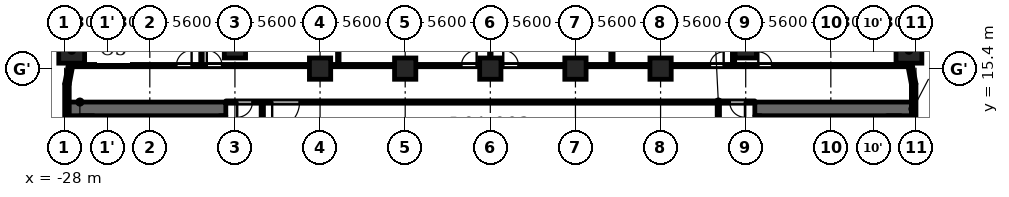
"""IFC4 building model, lengths in metres.
Left out: names, types, materials, properties, quantities, classifications, styles, units other than length and angle.
Written with IfcOpenShell. Run it as: python <this file> out.ifc"""

import sys

from ifc_helpers import new_model, si_unit, direction, frame, frame_2d, origin, origin_2d, place, context, subcontext, project, spatial, rectangle, extrude, element, fill, save


model = new_model("IFC4")
c1 = context("Model", 3, precision=1e-05, world=origin(), true_north=direction((0.0, 1.0)))
c2 = subcontext(c1, "Body", "Model", "MODEL_VIEW")
j1 = project(units=[si_unit("LENGTHUNIT", "METRE"), si_unit("PLANEANGLEUNIT", "RADIAN")], contexts=[c1])
p1 = place(None, origin())
s1 = spatial("IfcSite", under=j1, at=p1, CompositionType="ELEMENT")
p2 = place(p1, origin())
s2 = spatial("IfcBuilding", under=s1, at=p2, CompositionType="ELEMENT")
p3 = place(p2, frame((0.0, 0.0, 6.5)))
s3 = spatial("IfcBuildingStorey", under=s2, at=p3, CompositionType="ELEMENT", Elevation=6.5)
for number, where, z_axis, x_axis in (
    (1, (27.538, 16.609, 0.0), (0.0, 0.0, 1.0), (1.0, 0.0, 0.0)),
    (2, (-27.538, 16.609, 0.0), (0.0, 0.0, 1.0), (1.0, 0.0, 0.0)),
):
    element("IfcColumn", number, at=place(p3, frame(where, z_axis=z_axis, x_axis=x_axis)), inside=s3, PredefinedType="COLUMN", context=c2, shape_type="SweptSolid", body=[
        extrude(rectangle(XDim=1.7, YDim=1.7, at=origin_2d()), origin(), (0.0, 0.0, 1.0), 4.8),
    ])
for number, where, z_axis, x_axis in (
    (3, (-16.8, 16.8, 0.0), (0.0, 0.0, 1.0), (1.0, 0.0, 0.0)),
    (4, (16.8, 16.8, 0.0), (0.0, 0.0, 1.0), (1.0, 0.0, 0.0)),
    (5, (-11.2, 15.4, 0.0), (0.0, 0.0, 1.0), (1.0, 0.0, 0.0)),
    (6, (-5.6, 15.4, 0.0), (0.0, 0.0, 1.0), (1.0, 0.0, 0.0)),
    (7, (0.0, 15.4, 0.0), (0.0, 0.0, 1.0), (1.0, 0.0, 0.0)),
    (8, (5.6, 15.4, 0.0), (0.0, 0.0, 1.0), (1.0, 0.0, 0.0)),
    (9, (11.2, 15.4, 0.0), (0.0, 0.0, 1.0), (1.0, 0.0, 0.0)),
):
    element("IfcColumn", number, at=place(p3, frame(where, z_axis=z_axis, x_axis=x_axis)), inside=s3, PredefinedType="COLUMN", context=c2, shape_type="SweptSolid", body=[
        extrude(rectangle(XDim=1.4, YDim=1.4, at=origin_2d()), origin(), (0.0, 0.0, 1.0), 4.8),
    ])
p4 = place(p3, frame((27.85, 12.05, 0.0), z_axis=(0.0, 0.0, 1.0), x_axis=(0.0, 1.0, 0.0)))
e10 = element("IfcWall", 10, at=p4, inside=s3, PredefinedType="SOLIDWALL", context=c2, shape_type="SweptSolid", body=[
    extrude(rectangle(XDim=2.35, YDim=0.3, at=frame_2d((1.175, 0.0))), origin(), (0.0, 0.0, 1.0), 3.55),
])
for number, where, z_axis, x_axis in (
    (11, (27.853, 14.372, 0.0), (0.0, 0.0, 1.0), (-0.187, 0.982, 0.0)),
    (12, (-27.589, 15.753, 0.0), (0.0, 0.0, 1.0), (-0.187, -0.982, 0.0)),
):
    element("IfcWall", number, at=place(p3, frame(where, z_axis=z_axis, x_axis=x_axis)), inside=s3, PredefinedType="SOLIDWALL", context=c2, shape_type="SweptSolid", body=[
        extrude(rectangle(XDim=1.406, YDim=0.3, at=frame_2d((0.703, 0.0))), origin(), (0.0, 0.0, 1.0), 3.55),
    ])
p5 = place(p3, frame((-27.85, 14.4, 0.0), z_axis=(0.0, 0.0, 1.0), x_axis=(0.0, -1.0, 0.0)))
e13 = element("IfcWall", 13, at=p5, inside=s3, PredefinedType="SOLIDWALL", context=c2, shape_type="SweptSolid", body=[
    extrude(rectangle(XDim=2.35, YDim=0.3, at=frame_2d((1.175, 0.0))), origin(), (0.0, 0.0, 1.0), 3.55),
])
p6 = place(p3, frame((-17.4, 12.75, 0.0), z_axis=(0.0, 0.0, 1.0), x_axis=(-1.0, 0.0, 0.0)))
e14 = element("IfcWall", 14, at=p6, inside=s3, PredefinedType="SHEAR", context=c2, shape_type="SweptSolid", body=[
    extrude(rectangle(XDim=10.4, YDim=0.9, at=frame_2d((5.2, 0.0))), origin(), (0.0, 0.0, 1.0), 4.45),
])
p7 = place(p3, frame((-17.6, -12.3, 0.0), z_axis=(0.0, 0.0, 1.0), x_axis=(0.0, 1.0, 0.0)))
e15 = element("IfcWall", 15, at=p7, inside=s3, PredefinedType="SHEAR", context=c2, shape_type="SweptSolid", body=[
    extrude(rectangle(XDim=24.6, YDim=0.4, at=frame_2d((12.3, 0.0))), origin(), (0.0, 0.0, 1.0), 4.45),
])
p8 = place(p7, frame((6.0, 0.0, 0.0)))
e16 = element("IfcOpeningElement", 16, at=p8, cuts=e15, PredefinedType="OPENING", context=c2, shape_type="SweptSolid", body=[
    extrude(rectangle(XDim=1.1, YDim=2.1, at=frame_2d((0.55, 1.05))), frame((0.0, 0.21, 0.0), z_axis=(0.0, -1.0, 0.0), x_axis=(1.0, 0.0, 0.0)), (0.0, 0.0, 1.0), 0.42),
])
p9 = place(p7, frame((8.4, 0.0, 0.0)))
e17 = element("IfcOpeningElement", 17, at=p9, cuts=e15, PredefinedType="OPENING", context=c2, shape_type="SweptSolid", body=[
    extrude(rectangle(XDim=1.1, YDim=2.1, at=frame_2d((0.55, 1.05))), frame((0.0, 0.21, 0.0), z_axis=(0.0, -1.0, 0.0), x_axis=(1.0, 0.0, 0.0)), (0.0, 0.0, 1.0), 0.42),
])
p10 = place(p7, frame((10.8, 0.0, 0.0)))
e18 = element("IfcOpeningElement", 18, at=p10, cuts=e15, PredefinedType="OPENING", context=c2, shape_type="SweptSolid", body=[
    extrude(rectangle(XDim=1.1, YDim=2.1, at=frame_2d((0.55, 1.05))), frame((0.0, 0.21, 0.0), z_axis=(0.0, -1.0, 0.0), x_axis=(1.0, 0.0, 0.0)), (0.0, 0.0, 1.0), 0.42),
])
p11 = place(p7, frame((16.75, 0.0, 0.0)))
e19 = element("IfcOpeningElement", 19, at=p11, cuts=e15, PredefinedType="OPENING", context=c2, shape_type="SweptSolid", body=[
    extrude(rectangle(XDim=0.9, YDim=2.1, at=frame_2d((0.45, 1.05))), frame((0.0, 0.21, 0.0), z_axis=(0.0, -1.0, 0.0), x_axis=(1.0, 0.0, 0.0)), (0.0, 0.0, 1.0), 0.42),
])
p12 = place(p7, frame((22.8, 0.0, 0.0)))
e20 = element("IfcOpeningElement", 20, at=p12, cuts=e15, PredefinedType="OPENING", context=c2, shape_type="SweptSolid", body=[
    extrude(rectangle(XDim=1.1, YDim=2.1, at=frame_2d((0.55, 1.05))), frame((0.0, 0.21, 0.0), z_axis=(0.0, -1.0, 0.0), x_axis=(1.0, 0.0, 0.0)), (0.0, 0.0, 1.0), 0.42),
])
p13 = place(p7, frame((0.7, 0.0, 0.0)))
e21 = element("IfcOpeningElement", 21, at=p13, cuts=e15, PredefinedType="OPENING", context=c2, shape_type="SweptSolid", body=[
    extrude(rectangle(XDim=1.1, YDim=2.1, at=frame_2d((0.55, 1.05))), frame((0.0, 0.21, 0.0), z_axis=(0.0, -1.0, 0.0), x_axis=(1.0, 0.0, 0.0)), (0.0, 0.0, 1.0), 0.42),
])
p14 = place(p7, frame((12.775, 0.0, 0.0)))
e22 = element("IfcOpeningElement", 22, at=p14, cuts=e15, PredefinedType="OPENING", context=c2, shape_type="SweptSolid", body=[
    extrude(rectangle(XDim=1.8, YDim=2.1, at=frame_2d((0.9, 1.05))), frame((0.0, 0.21, 0.0), z_axis=(0.0, -1.0, 0.0), x_axis=(1.0, 0.0, 0.0)), (0.0, 0.0, 1.0), 0.42),
])
p15 = place(p3, frame((-26.55, -12.3, 0.0), z_axis=(0.0, 0.0, 1.0), x_axis=(0.0, 1.0, 0.0)))
e23 = element("IfcWall", 23, at=p15, inside=s3, PredefinedType="SHEAR", context=c2, shape_type="SweptSolid", body=[
    extrude(rectangle(XDim=24.6, YDim=0.9, at=frame_2d((12.3, 0.0))), origin(), (0.0, 0.0, 1.0), 4.45),
])
p16 = place(p3, frame((-23.55, 9.8, 0.0), z_axis=(0.0, 0.0, 1.0), x_axis=(0.0, 1.0, 0.0)))
e24 = element("IfcWall", 24, at=p16, inside=s3, PredefinedType="PARTITIONING", context=c2, shape_type="SweptSolid", body=[
    extrude(rectangle(XDim=2.5, YDim=0.2, at=frame_2d((1.25, 0.0))), origin(), (0.0, 0.0, 1.0), 4.45),
])
p17 = place(p16, frame((0.8, 0.0, 0.0)))
e25 = element("IfcOpeningElement", 25, at=p17, cuts=e24, PredefinedType="OPENING", context=c2, shape_type="SweptSolid", body=[
    extrude(rectangle(XDim=0.9, YDim=2.1, at=frame_2d((0.45, 1.05))), frame((0.0, 0.11, 0.0), z_axis=(0.0, -1.0, 0.0), x_axis=(1.0, 0.0, 0.0)), (0.0, 0.0, 1.0), 0.22),
])
p18 = place(p3, frame((17.4, 12.75, 0.0), z_axis=(0.0, 0.0, 1.0), x_axis=(1.0, 0.0, 0.0)))
e26 = element("IfcWall", 26, at=p18, inside=s3, PredefinedType="SHEAR", context=c2, shape_type="SweptSolid", body=[
    extrude(rectangle(XDim=10.4, YDim=0.9, at=frame_2d((5.2, 0.0))), origin(), (0.0, 0.0, 1.0), 4.45),
])
p19 = place(p3, frame((17.6, -12.3, 0.0), z_axis=(0.0, 0.0, 1.0), x_axis=(0.0, 1.0, 0.0)))
e27 = element("IfcWall", 27, at=p19, inside=s3, PredefinedType="SHEAR", context=c2, shape_type="SweptSolid", body=[
    extrude(rectangle(XDim=24.6, YDim=0.4, at=frame_2d((12.3, 0.0))), origin(), (0.0, 0.0, 1.0), 4.45),
])
p20 = place(p19, frame((6.0, 0.0, 0.0)))
e28 = element("IfcOpeningElement", 28, at=p20, cuts=e27, PredefinedType="OPENING", context=c2, shape_type="SweptSolid", body=[
    extrude(rectangle(XDim=1.1, YDim=2.1, at=frame_2d((0.55, 1.05))), frame((0.0, 0.21, 0.0), z_axis=(0.0, -1.0, 0.0), x_axis=(1.0, 0.0, 0.0)), (0.0, 0.0, 1.0), 0.42),
])
p21 = place(p19, frame((8.4, 0.0, 0.0)))
e29 = element("IfcOpeningElement", 29, at=p21, cuts=e27, PredefinedType="OPENING", context=c2, shape_type="SweptSolid", body=[
    extrude(rectangle(XDim=1.1, YDim=2.1, at=frame_2d((0.55, 1.05))), frame((0.0, 0.21, 0.0), z_axis=(0.0, -1.0, 0.0), x_axis=(1.0, 0.0, 0.0)), (0.0, 0.0, 1.0), 0.42),
])
p22 = place(p19, frame((10.8, 0.0, 0.0)))
e30 = element("IfcOpeningElement", 30, at=p22, cuts=e27, PredefinedType="OPENING", context=c2, shape_type="SweptSolid", body=[
    extrude(rectangle(XDim=1.1, YDim=2.1, at=frame_2d((0.55, 1.05))), frame((0.0, 0.21, 0.0), z_axis=(0.0, -1.0, 0.0), x_axis=(1.0, 0.0, 0.0)), (0.0, 0.0, 1.0), 0.42),
])
p23 = place(p19, frame((16.75, 0.0, 0.0)))
e31 = element("IfcOpeningElement", 31, at=p23, cuts=e27, PredefinedType="OPENING", context=c2, shape_type="SweptSolid", body=[
    extrude(rectangle(XDim=0.9, YDim=2.1, at=frame_2d((0.45, 1.05))), frame((0.0, 0.21, 0.0), z_axis=(0.0, -1.0, 0.0), x_axis=(1.0, 0.0, 0.0)), (0.0, 0.0, 1.0), 0.42),
])
p24 = place(p19, frame((22.8, 0.0, 0.0)))
e32 = element("IfcOpeningElement", 32, at=p24, cuts=e27, PredefinedType="OPENING", context=c2, shape_type="SweptSolid", body=[
    extrude(rectangle(XDim=1.1, YDim=2.1, at=frame_2d((0.55, 1.05))), frame((0.0, 0.21, 0.0), z_axis=(0.0, -1.0, 0.0), x_axis=(1.0, 0.0, 0.0)), (0.0, 0.0, 1.0), 0.42),
])
p25 = place(p19, frame((0.7, 0.0, 0.0)))
e33 = element("IfcOpeningElement", 33, at=p25, cuts=e27, PredefinedType="OPENING", context=c2, shape_type="SweptSolid", body=[
    extrude(rectangle(XDim=1.1, YDim=2.1, at=frame_2d((0.55, 1.05))), frame((0.0, 0.21, 0.0), z_axis=(0.0, -1.0, 0.0), x_axis=(1.0, 0.0, 0.0)), (0.0, 0.0, 1.0), 0.42),
])
p26 = place(p19, frame((12.775, 0.0, 0.0)))
e34 = element("IfcOpeningElement", 34, at=p26, cuts=e27, PredefinedType="OPENING", context=c2, shape_type="SweptSolid", body=[
    extrude(rectangle(XDim=1.8, YDim=2.1, at=frame_2d((0.9, 1.05))), frame((0.0, 0.21, 0.0), z_axis=(0.0, -1.0, 0.0), x_axis=(1.0, 0.0, 0.0)), (0.0, 0.0, 1.0), 0.42),
])
p27 = place(p3, frame((26.55, -12.3, 0.0), z_axis=(0.0, 0.0, 1.0), x_axis=(0.0, 1.0, 0.0)))
e35 = element("IfcWall", 35, at=p27, inside=s3, PredefinedType="SHEAR", context=c2, shape_type="SweptSolid", body=[
    extrude(rectangle(XDim=24.6, YDim=0.9, at=frame_2d((12.3, 0.0))), origin(), (0.0, 0.0, 1.0), 4.45),
])
p28 = place(p3, frame((23.55, 9.8, 0.0), z_axis=(0.0, 0.0, 1.0), x_axis=(0.0, 1.0, 0.0)))
e36 = element("IfcWall", 36, at=p28, inside=s3, PredefinedType="PARTITIONING", context=c2, shape_type="SweptSolid", body=[
    extrude(rectangle(XDim=2.5, YDim=0.2, at=frame_2d((1.25, 0.0))), origin(), (0.0, 0.0, 1.0), 4.45),
])
p29 = place(p28, frame((0.8, 0.0, 0.0)))
e37 = element("IfcOpeningElement", 37, at=p29, cuts=e36, PredefinedType="OPENING", context=c2, shape_type="SweptSolid", body=[
    extrude(rectangle(XDim=0.9, YDim=2.1, at=frame_2d((0.45, 1.05))), frame((0.0, 0.11, 0.0), z_axis=(0.0, -1.0, 0.0), x_axis=(1.0, 0.0, 0.0)), (0.0, 0.0, 1.0), 0.22),
])
p30 = place(p3, frame((-17.4, 13.2, 0.0), z_axis=(0.0, 0.0, 1.0), x_axis=(1.0, 0.0, 0.0)))
e38 = element("IfcWall", 38, at=p30, inside=s3, PredefinedType="PARTITIONING", context=c2, shape_type="SweptSolid", body=[
    extrude(rectangle(XDim=34.8, YDim=0.15, at=frame_2d((17.4, 0.0))), origin(), (0.0, 0.0, 1.0), 4.45),
])
p31 = place(p30, frame((3.05, 0.0, 0.0)))
e39 = element("IfcOpeningElement", 39, at=p31, cuts=e38, PredefinedType="OPENING", context=c2, shape_type="SweptSolid", body=[
    extrude(rectangle(XDim=1.8, YDim=2.1, at=frame_2d((0.9, 1.05))), frame((0.0, 0.085, 0.0), z_axis=(0.0, -1.0, 0.0), x_axis=(1.0, 0.0, 0.0)), (0.0, 0.0, 1.0), 0.17),
])
p32 = place(p30, frame((0.75, 0.0, 0.0)))
e40 = element("IfcOpeningElement", 40, at=p32, cuts=e38, PredefinedType="OPENING", context=c2, shape_type="SweptSolid", body=[
    extrude(rectangle(XDim=1.0, YDim=2.1, at=frame_2d((0.5, 1.05))), frame((0.0, 0.085, 0.0), z_axis=(0.0, -1.0, 0.0), x_axis=(1.0, 0.0, 0.0)), (0.0, 0.0, 1.0), 0.17),
])
p33 = place(p30, frame((33.15, 0.0, 0.0)))
e41 = element("IfcOpeningElement", 41, at=p33, cuts=e38, PredefinedType="OPENING", context=c2, shape_type="SweptSolid", body=[
    extrude(rectangle(XDim=1.0, YDim=2.1, at=frame_2d((0.5, 1.05))), frame((0.0, 0.085, 0.0), z_axis=(0.0, -1.0, 0.0), x_axis=(1.0, 0.0, 0.0)), (0.0, 0.0, 1.0), 0.17),
])
p34 = place(p3, frame((-27.446, 15.6, 0.0), z_axis=(0.0, 0.0, 1.0), x_axis=(1.0, 0.0, 0.0)))
e42 = element("IfcWall", 42, at=p34, inside=s3, PredefinedType="PARTITIONING", context=c2, shape_type="SweptSolid", body=[
    extrude(rectangle(XDim=54.892, YDim=0.15, at=frame_2d((27.446, 0.0))), origin(), (0.0, 0.0, 1.0), 4.45),
])
p35 = place(p34, frame((6.796, 0.0, 0.0)))
e43 = element("IfcOpeningElement", 43, at=p35, cuts=e42, PredefinedType="OPENING", context=c2, shape_type="SweptSolid", body=[
    extrude(rectangle(XDim=1.0, YDim=2.1, at=frame_2d((0.5, 1.05))), frame((0.0, 0.085, 0.0), z_axis=(0.0, -1.0, 0.0), x_axis=(1.0, 0.0, 0.0)), (0.0, 0.0, 1.0), 0.17),
])
p36 = place(p34, frame((8.796, 0.0, 0.0)))
e44 = element("IfcOpeningElement", 44, at=p36, cuts=e42, PredefinedType="OPENING", context=c2, shape_type="SweptSolid", body=[
    extrude(rectangle(XDim=1.0, YDim=2.1, at=frame_2d((0.5, 1.05))), frame((0.0, 0.085, 0.0), z_axis=(0.0, -1.0, 0.0), x_axis=(1.0, 0.0, 0.0)), (0.0, 0.0, 1.0), 0.17),
])
p37 = place(p34, frame((25.546, 0.0, 0.0)))
e45 = element("IfcOpeningElement", 45, at=p37, cuts=e42, PredefinedType="OPENING", context=c2, shape_type="SweptSolid", body=[
    extrude(rectangle(XDim=1.0, YDim=2.1, at=frame_2d((0.5, 1.05))), frame((0.0, 0.085, 0.0), z_axis=(0.0, -1.0, 0.0), x_axis=(1.0, 0.0, 0.0)), (0.0, 0.0, 1.0), 0.17),
])
p38 = place(p34, frame((28.296, 0.0, 0.0)))
e46 = element("IfcOpeningElement", 46, at=p38, cuts=e42, PredefinedType="OPENING", context=c2, shape_type="SweptSolid", body=[
    extrude(rectangle(XDim=1.0, YDim=2.1, at=frame_2d((0.5, 1.05))), frame((0.0, 0.085, 0.0), z_axis=(0.0, -1.0, 0.0), x_axis=(1.0, 0.0, 0.0)), (0.0, 0.0, 1.0), 0.17),
])
p39 = place(p34, frame((41.896, 0.0, 0.0)))
e47 = element("IfcOpeningElement", 47, at=p39, cuts=e42, PredefinedType="OPENING", context=c2, shape_type="SweptSolid", body=[
    extrude(rectangle(XDim=0.9, YDim=2.1, at=frame_2d((0.45, 1.05))), frame((0.0, 0.085, 0.0), z_axis=(0.0, -1.0, 0.0), x_axis=(1.0, 0.0, 0.0)), (0.0, 0.0, 1.0), 0.17),
])
p40 = place(p34, frame((45.075, 0.0, 0.0)))
e48 = element("IfcOpeningElement", 48, at=p40, cuts=e42, PredefinedType="OPENING", context=c2, shape_type="SweptSolid", body=[
    extrude(rectangle(XDim=0.9, YDim=2.1, at=frame_2d((0.45, 1.05))), frame((0.0, 0.085, 0.0), z_axis=(0.0, -1.0, 0.0), x_axis=(1.0, 0.0, 0.0)), (0.0, 0.0, 1.0), 0.17),
])
p41 = place(p3, frame((-19.0, 15.675, 0.0), z_axis=(0.0, 0.0, 1.0), x_axis=(0.0, 1.0, 0.0)))
e49 = element("IfcWall", 49, at=p41, inside=s3, PredefinedType="PARTITIONING", context=c2, shape_type="SweptSolid", body=[
    extrude(rectangle(XDim=6.405, YDim=0.1, at=frame_2d((3.203, 0.0))), origin(), (0.0, 0.0, 1.0), 4.45),
])
p42 = place(p3, frame((-15.0, 6.769, 0.0), z_axis=(0.0, 0.0, 1.0), x_axis=(0.0, 1.0, 0.0)))
e50 = element("IfcWall", 50, at=p42, inside=s3, PredefinedType="PARTITIONING", context=c2, shape_type="SweptSolid", body=[
    extrude(rectangle(XDim=6.356, YDim=0.15, at=frame_2d((3.178, 0.0))), origin(), (0.0, 0.0, 1.0), 4.45),
])
p43 = place(p3, frame((-10.0, 15.675, 0.0), z_axis=(0.0, 0.0, 1.0), x_axis=(0.0, 1.0, 0.0)))
e51 = element("IfcWall", 51, at=p43, inside=s3, PredefinedType="PARTITIONING", context=c2, shape_type="SweptSolid", body=[
    extrude(rectangle(XDim=6.405, YDim=0.1, at=frame_2d((3.203, 0.0))), origin(), (0.0, 0.0, 1.0), 4.45),
])
p44 = place(p3, frame((0.0, 15.675, 0.0), z_axis=(0.0, 0.0, 1.0), x_axis=(0.0, 1.0, 0.0)))
e52 = element("IfcWall", 52, at=p44, inside=s3, PredefinedType="PARTITIONING", context=c2, shape_type="SweptSolid", body=[
    extrude(rectangle(XDim=6.635, YDim=0.1, at=frame_2d((3.317, 0.0))), origin(), (0.0, 0.0, 1.0), 4.45),
])
p45 = place(p3, frame((8.0, 15.675, 0.0), z_axis=(0.0, 0.0, 1.0), x_axis=(0.0, 1.0, 0.0)))
e53 = element("IfcWall", 53, at=p45, inside=s3, PredefinedType="PARTITIONING", context=c2, shape_type="SweptSolid", body=[
    extrude(rectangle(XDim=6.405, YDim=0.15, at=frame_2d((3.203, 0.0))), origin(), (0.0, 0.0, 1.0), 4.45),
])
p46 = place(p3, frame((15.0, 6.769, 0.0), z_axis=(0.0, 0.0, 1.0), x_axis=(0.0, 1.0, 0.0)))
e54 = element("IfcWall", 54, at=p46, inside=s3, PredefinedType="PARTITIONING", context=c2, shape_type="SweptSolid", body=[
    extrude(rectangle(XDim=6.356, YDim=0.15, at=frame_2d((3.178, 0.0))), origin(), (0.0, 0.0, 1.0), 4.45),
])
p47 = place(p3, frame((16.0, 15.675, 0.0), z_axis=(0.0, 0.0, 1.0), x_axis=(0.0, 1.0, 0.0)))
e55 = element("IfcWall", 55, at=p47, inside=s3, PredefinedType="PARTITIONING", context=c2, shape_type="SweptSolid", body=[
    extrude(rectangle(XDim=6.635, YDim=0.15, at=frame_2d((3.317, 0.0))), origin(), (0.0, 0.0, 1.0), 4.45),
])
p48 = place(p31, origin())
e56 = element("IfcDoor", 56, at=p48, inside=s3, OperationType="SINGLE_SWING_LEFT", PredefinedType="DOOR", context=c2, shape_type="SweptSolid", body=[
    extrude(rectangle(XDim=1.8, YDim=2.1, at=frame_2d((0.9, 1.05))), frame((0.0, 0.025, 0.0), z_axis=(0.0, -1.0, 0.0), x_axis=(1.0, 0.0, 0.0)), (0.0, 0.0, 1.0), 0.05),
])
fill(e39, e56)
p49 = place(p32, origin())
e57 = element("IfcDoor", 57, at=p49, inside=s3, OperationType="SINGLE_SWING_LEFT", PredefinedType="DOOR", context=c2, shape_type="SweptSolid", body=[
    extrude(rectangle(XDim=1.0, YDim=2.1, at=frame_2d((0.5, 1.05))), frame((0.0, 0.025, 0.0), z_axis=(0.0, -1.0, 0.0), x_axis=(1.0, 0.0, 0.0)), (0.0, 0.0, 1.0), 0.05),
])
fill(e40, e57)
p50 = place(p33, origin())
e58 = element("IfcDoor", 58, at=p50, inside=s3, OperationType="SINGLE_SWING_RIGHT", PredefinedType="DOOR", context=c2, shape_type="SweptSolid", body=[
    extrude(rectangle(XDim=1.0, YDim=2.1, at=frame_2d((0.5, 1.05))), frame((0.0, 0.025, 0.0), z_axis=(0.0, -1.0, 0.0), x_axis=(1.0, 0.0, 0.0)), (0.0, 0.0, 1.0), 0.05),
])
fill(e41, e58)
p51 = place(p35, origin())
e59 = element("IfcDoor", 59, at=p51, inside=s3, OperationType="SINGLE_SWING_LEFT", PredefinedType="DOOR", context=c2, shape_type="SweptSolid", body=[
    extrude(rectangle(XDim=1.0, YDim=2.1, at=frame_2d((0.5, 1.05))), frame((0.0, 0.025, 0.0), z_axis=(0.0, -1.0, 0.0), x_axis=(1.0, 0.0, 0.0)), (0.0, 0.0, 1.0), 0.05),
])
fill(e43, e59)
p52 = place(p36, origin())
e60 = element("IfcDoor", 60, at=p52, inside=s3, OperationType="SINGLE_SWING_RIGHT", PredefinedType="DOOR", context=c2, shape_type="SweptSolid", body=[
    extrude(rectangle(XDim=1.0, YDim=2.1, at=frame_2d((0.5, 1.05))), frame((0.0, 0.025, 0.0), z_axis=(0.0, -1.0, 0.0), x_axis=(1.0, 0.0, 0.0)), (0.0, 0.0, 1.0), 0.05),
])
fill(e44, e60)
p53 = place(p37, origin())
e61 = element("IfcDoor", 61, at=p53, inside=s3, OperationType="SINGLE_SWING_LEFT", PredefinedType="DOOR", context=c2, shape_type="SweptSolid", body=[
    extrude(rectangle(XDim=1.0, YDim=2.1, at=frame_2d((0.5, 1.05))), frame((0.0, 0.025, 0.0), z_axis=(0.0, -1.0, 0.0), x_axis=(1.0, 0.0, 0.0)), (0.0, 0.0, 1.0), 0.05),
])
fill(e45, e61)
p54 = place(p38, origin())
e62 = element("IfcDoor", 62, at=p54, inside=s3, OperationType="SINGLE_SWING_RIGHT", PredefinedType="DOOR", context=c2, shape_type="SweptSolid", body=[
    extrude(rectangle(XDim=1.0, YDim=2.1, at=frame_2d((0.5, 1.05))), frame((0.0, 0.025, 0.0), z_axis=(0.0, -1.0, 0.0), x_axis=(1.0, 0.0, 0.0)), (0.0, 0.0, 1.0), 0.05),
])
fill(e46, e62)
p55 = place(p39, origin())
e63 = element("IfcDoor", 63, at=p55, inside=s3, OperationType="SINGLE_SWING_LEFT", PredefinedType="DOOR", context=c2, shape_type="SweptSolid", body=[
    extrude(rectangle(XDim=0.9, YDim=2.1, at=frame_2d((0.45, 1.05))), frame((0.0, 0.025, 0.0), z_axis=(0.0, -1.0, 0.0), x_axis=(1.0, 0.0, 0.0)), (0.0, 0.0, 1.0), 0.05),
])
fill(e47, e63)
p56 = place(p40, origin())
e64 = element("IfcDoor", 64, at=p56, inside=s3, OperationType="SINGLE_SWING_RIGHT", PredefinedType="DOOR", context=c2, shape_type="SweptSolid", body=[
    extrude(rectangle(XDim=0.9, YDim=2.1, at=frame_2d((0.45, 1.05))), frame((0.0, 0.025, 0.0), z_axis=(0.0, -1.0, 0.0), x_axis=(1.0, 0.0, 0.0)), (0.0, 0.0, 1.0), 0.05),
])
fill(e48, e64)
save(model, sys.argv[1])
